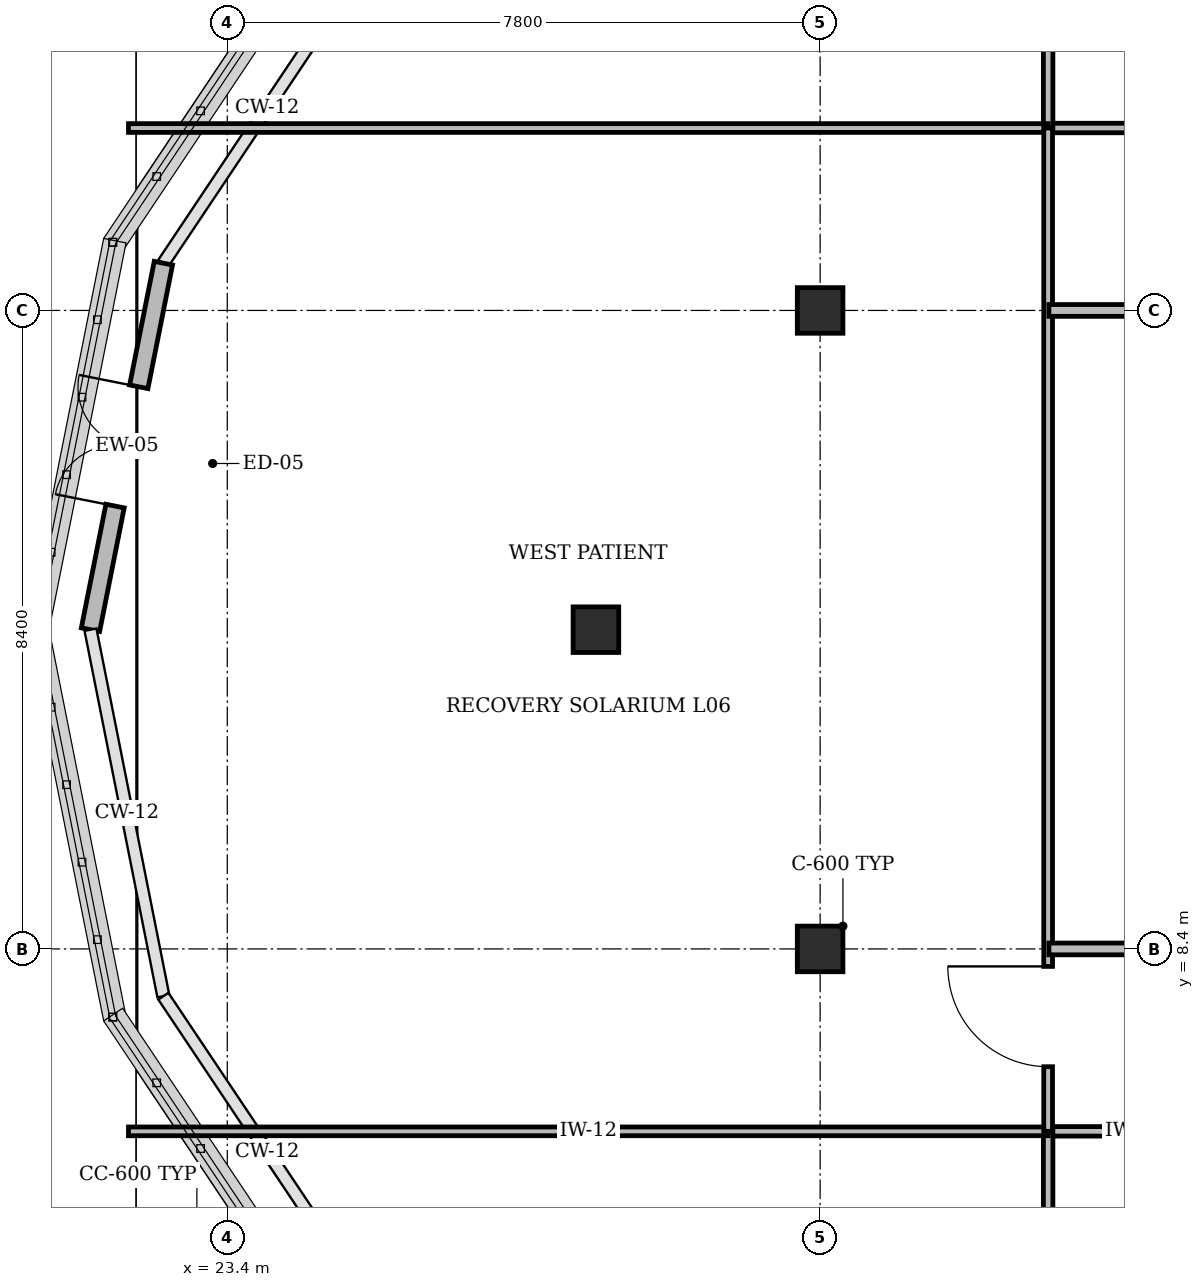
"""IFC4 building model, lengths in metres.
Left out: names, types, materials, properties, quantities, classifications, styles, units other than length and angle.
Written with IfcOpenShell. Run it as: python <this file> out.ifc"""

import sys

from ifc_helpers import new_model, si_unit, direction, frame, frame_2d, origin, origin_2d, place, context, subcontext, project, spatial, rectangle, circle, extrude, element, fill, save


model = new_model("IFC4")
c1 = context("Model", 3, precision=1e-05, world=origin(), true_north=direction((0.0, 1.0)))
c2 = subcontext(c1, "Body", "Model", "MODEL_VIEW")
j1 = project(units=[si_unit("LENGTHUNIT", "METRE"), si_unit("PLANEANGLEUNIT", "RADIAN")], contexts=[c1])
p1 = place(None, origin())
s1 = spatial("IfcSite", under=j1, at=p1, CompositionType="ELEMENT")
p2 = place(p1, origin())
s2 = spatial("IfcBuilding", under=s1, at=p2, CompositionType="ELEMENT")
p3 = place(p2, frame((0.0, 0.0, 26.4)))
s3 = spatial("IfcBuildingStorey", under=s2, at=p3, CompositionType="ELEMENT", Elevation=26.4)
for number, where, z_axis, x_axis in (
    (1, (31.2, 8.4, 0.0), (0.0, 0.0, 1.0), (1.0, 0.0, 0.0)),
    (2, (31.2, 16.8, 0.0), (0.0, 0.0, 1.0), (1.0, 0.0, 0.0)),
):
    element("IfcColumn", number, at=place(p3, frame(where, z_axis=z_axis, x_axis=x_axis)), inside=s3, PredefinedType="COLUMN", context=c2, shape_type="SweptSolid", body=[
        extrude(rectangle(XDim=0.6, YDim=0.6, at=origin_2d()), origin(), (0.0, 0.0, 1.0), 4.2),
    ])
p4 = place(p3, frame((28.25, 12.6, 0.0), z_axis=(0.0, 0.0, 1.0), x_axis=(1.0, 0.0, 0.0)))
e3 = element("IfcColumn", 3, at=p4, inside=s3, PredefinedType="PILASTER", context=c2, shape_type="SweptSolid", body=[
    extrude(circle(Radius=0.3, at=origin_2d()), origin(), (0.0, 0.0, 1.0), 3.95),
])
p5 = place(p3, frame((21.6, 12.6, 0.0), z_axis=(0.0, 0.0, 1.0), x_axis=(0.195065517012, 0.980790214099, 0.0)))
e4 = element("IfcWall", 4, at=p5, inside=s3, PredefinedType="STANDARD", context=c2, shape_type="SweptSolid", body=[
    extrude(rectangle(XDim=4.916, YDim=0.245, at=frame_2d((2.458, 0.0))), origin(), (0.0, 0.0, 1.0), 3.27),
])
p6 = place(p5, frame((1.658, 0.0, 0.0)))
e5 = element("IfcOpeningElement", 5, at=p6, cuts=e4, PredefinedType="OPENING", context=c2, shape_type="SweptSolid", body=[
    extrude(rectangle(XDim=1.6, YDim=2.2, at=frame_2d((0.8, 1.1))), frame((0.0, 0.133, 0.0), z_axis=(0.0, -1.0, 0.0), x_axis=(1.0, 0.0, 0.0)), (0.0, 0.0, 1.0), 0.265),
])
p7 = place(p3, frame((34.2, 6.0, 0.0), z_axis=(0.0, 0.0, 1.0), x_axis=(1.0, 0.0, 0.0)))
e6 = element("IfcWall", 6, at=p7, inside=s3, PredefinedType="PARTITIONING", context=c2, shape_type="SweptSolid", body=[
    extrude(rectangle(XDim=2.25, YDim=0.125, at=frame_2d((1.125, 0.0))), origin(), (0.0, 0.0, 1.0), 3.9),
])
p8 = place(p3, frame((34.2, 0.045, 0.0), z_axis=(0.0, 0.0, 1.0), x_axis=(0.0, 1.0, 0.0)))
e7 = element("IfcWall", 7, at=p8, inside=s3, PredefinedType="PARTITIONING", context=c2, shape_type="SweptSolid", body=[
    extrude(rectangle(XDim=5.955, YDim=0.125, at=frame_2d((2.978, 0.0))), origin(), (0.0, 0.0, 1.0), 3.9),
])
p9 = place(p3, frame((34.2, 19.2, 0.0), z_axis=(0.0, 0.0, 1.0), x_axis=(1.0, 0.0, 0.0)))
e8 = element("IfcWall", 8, at=p9, inside=s3, PredefinedType="PARTITIONING", context=c2, shape_type="SweptSolid", body=[
    extrude(rectangle(XDim=2.25, YDim=0.125, at=frame_2d((1.125, 0.0))), origin(), (0.0, 0.0, 1.0), 3.9),
])
p10 = place(p3, frame((34.2, 19.2, 0.0), z_axis=(0.0, 0.0, 1.0), x_axis=(0.0, 1.0, 0.0)))
e9 = element("IfcWall", 9, at=p10, inside=s3, PredefinedType="PARTITIONING", context=c2, shape_type="SweptSolid", body=[
    extrude(rectangle(XDim=5.955, YDim=0.125, at=frame_2d((2.978, 0.0))), origin(), (0.0, 0.0, 1.0), 3.9),
])
for number, where, z_axis, x_axis in (
    (10, (22.1, 6.0, 0.0), (0.0, 0.0, 1.0), (1.0, 0.0, 0.0)),
    (11, (22.1, 19.2, 0.0), (0.0, 0.0, 1.0), (1.0, 0.0, 0.0)),
):
    element("IfcWall", number, at=place(p3, frame(where, z_axis=z_axis, x_axis=x_axis)), inside=s3, PredefinedType="PARTITIONING", context=c2, shape_type="SweptSolid", body=[
        extrude(rectangle(XDim=12.1, YDim=0.115, at=frame_2d((6.05, 0.0))), origin(), (0.0, 0.0, 1.0), 3.9),
    ])
p11 = place(p3, frame((34.2, 6.0, 0.0), z_axis=(0.0, 0.0, 1.0), x_axis=(0.0, 1.0, 0.0)))
e12 = element("IfcWall", 12, at=p11, inside=s3, PredefinedType="PARTITIONING", context=c2, shape_type="SweptSolid", body=[
    extrude(rectangle(XDim=13.2, YDim=0.115, at=frame_2d((6.6, 0.0))), origin(), (0.0, 0.0, 1.0), 3.9),
])
p12 = place(p11, frame((0.85, 0.0, 0.0)))
e13 = element("IfcOpeningElement", 13, at=p12, cuts=e12, PredefinedType="OPENING", context=c2, shape_type="SweptSolid", body=[
    extrude(rectangle(XDim=1.32, YDim=2.15, at=frame_2d((0.66, 1.075))), frame((0.0, 0.067, 0.0), z_axis=(0.0, -1.0, 0.0), x_axis=(1.0, 0.0, 0.0)), (0.0, 0.0, 1.0), 0.135),
])
p13 = place(p3, frame((34.21, 8.4, 0.0), z_axis=(0.0, 0.0, 1.0), x_axis=(1.0, 0.0, 0.0)))
e14 = element("IfcWall", 14, at=p13, inside=s3, PredefinedType="PARTITIONING", context=c2, shape_type="SweptSolid", body=[
    extrude(rectangle(XDim=12.03, YDim=0.155, at=frame_2d((6.015, 0.0))), origin(), (0.0, 0.0, 1.0), 3.27),
])
p14 = place(p13, frame((6.518, 0.0, 0.0)))
e15 = element("IfcOpeningElement", 15, at=p14, cuts=e14, PredefinedType="OPENING", context=c2, shape_type="SweptSolid", body=[
    extrude(rectangle(XDim=1.4, YDim=2.2, at=frame_2d((0.7, 1.1))), frame((0.0, 0.087, 0.0), z_axis=(0.0, -1.0, 0.0), x_axis=(1.0, 0.0, 0.0)), (0.0, 0.0, 1.0), 0.175),
])
p15 = place(p3, frame((34.21, 16.8, 0.0), z_axis=(0.0, 0.0, 1.0), x_axis=(1.0, 0.0, 0.0)))
e16 = element("IfcWall", 16, at=p15, inside=s3, PredefinedType="PARTITIONING", context=c2, shape_type="SweptSolid", body=[
    extrude(rectangle(XDim=12.03, YDim=0.155, at=frame_2d((6.015, 0.0))), origin(), (0.0, 0.0, 1.0), 3.27),
])
p16 = place(p6, origin())
e17 = element("IfcDoor", 17, at=p16, inside=s3, OperationType="DOUBLE_DOOR_SINGLE_SWING", PredefinedType="DOOR", context=c2, shape_type="SweptSolid", body=[
    extrude(rectangle(XDim=1.6, YDim=2.2, at=frame_2d((0.8, 1.1))), frame((0.0, 0.025, 0.0), z_axis=(0.0, -1.0, 0.0), x_axis=(1.0, 0.0, 0.0)), (0.0, 0.0, 1.0), 0.05),
])
fill(e5, e17)
p17 = place(p12, origin())
e18 = element("IfcDoor", 18, at=p17, inside=s3, OperationType="SINGLE_SWING_RIGHT", PredefinedType="DOOR", context=c2, shape_type="SweptSolid", body=[
    extrude(rectangle(XDim=1.32, YDim=2.15, at=frame_2d((0.66, 1.075))), frame((0.0, 0.025, 0.0), z_axis=(0.0, -1.0, 0.0), x_axis=(1.0, 0.0, 0.0)), (0.0, 0.0, 1.0), 0.05),
])
fill(e13, e18)
save(model, sys.argv[1])
